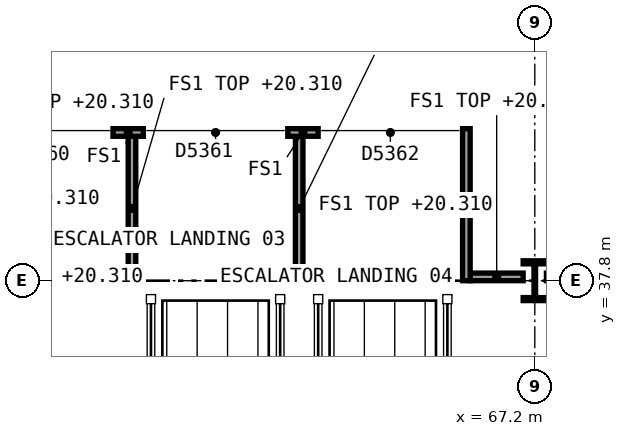
"""IFC4 building model, lengths in metres.
Left out: names, types, materials, properties, quantities, classifications, styles, units other than length and angle.
Written with IfcOpenShell. Run it as: python <this file> out.ifc"""

import sys

from ifc_helpers import new_model, si_unit, direction, frame, frame_2d, origin, origin_2d, place, context, subcontext, project, spatial, rectangle, i_section, extrude, element, fill, save


model = new_model("IFC4")
c1 = context("Model", 3, precision=1e-05, world=origin(), true_north=direction((0.0, 1.0)))
c2 = subcontext(c1, "Body", "Model", "MODEL_VIEW")
j1 = project(units=[si_unit("LENGTHUNIT", "METRE"), si_unit("PLANEANGLEUNIT", "RADIAN")], contexts=[c1])
p1 = place(None, origin())
s1 = spatial("IfcSite", under=j1, at=p1, CompositionType="ELEMENT")
p2 = place(p1, origin())
s2 = spatial("IfcBuilding", under=s1, at=p2, CompositionType="ELEMENT")
p3 = place(p2, frame((0.0, 0.0, 16.2)))
s3 = spatial("IfcBuildingStorey", under=s2, at=p3, CompositionType="ELEMENT", Elevation=16.2)
p4 = place(p3, frame((67.2, 37.8, 0.0), z_axis=(0.0, 0.0, 1.0), x_axis=(1.0, 0.0, 0.0)))
e1 = element("IfcColumn", 1, at=p4, inside=s3, PredefinedType="COLUMN", context=c2, shape_type="SweptSolid", body=[
    extrude(i_section(OverallWidth=0.306, OverallDepth=0.524, WebThickness=0.021, FlangeThickness=0.04, FilletRadius=0.027, at=origin_2d()), origin(), (0.0, 0.0, 1.0), 4.8),
])
p5 = place(p3, frame((66.35, 37.85, 0.0), z_axis=(0.0, 0.0, 1.0), x_axis=(1.0, 0.0, 0.0)))
e2 = element("IfcWall", 2, at=p5, inside=s3, PredefinedType="PARTITIONING", context=c2, shape_type="SweptSolid", body=[
    extrude(rectangle(XDim=0.697, YDim=0.1, at=frame_2d((0.349, 0.0))), origin(), (0.0, 0.0, 1.0), 4.11),
])
for number, where, z_axis, x_axis in (
    (3, (61.9, 37.8, 0.0), (0.0, 0.0, 1.0), (0.0, 1.0, 0.0)),
    (4, (64.1, 37.8, 0.0), (0.0, 0.0, 1.0), (0.0, 1.0, 0.0)),
):
    element("IfcWall", number, at=place(p3, frame(where, z_axis=z_axis, x_axis=x_axis)), inside=s3, PredefinedType="PARTITIONING", context=c2, shape_type="SweptSolid", body=[
        extrude(rectangle(XDim=1.9, YDim=0.1, at=frame_2d((0.95, 0.0))), origin(), (0.0, 0.0, 1.0), 4.11),
    ])
p6 = place(p3, frame((66.3, 37.8, 0.0), z_axis=(0.0, 0.0, 1.0), x_axis=(0.0, 1.0, 0.0)))
e5 = element("IfcWall", 5, at=p6, inside=s3, PredefinedType="PARTITIONING", context=c2, shape_type="SweptSolid", body=[
    extrude(rectangle(XDim=2.0, YDim=0.1, at=frame_2d((1.0, 0.0))), origin(), (0.0, 0.0, 1.0), 4.11),
])
p7 = place(p3, frame((59.75, 39.75, 0.0), z_axis=(0.0, 0.0, 1.0), x_axis=(1.0, 0.0, 0.0)))
e6 = element("IfcWall", 6, at=p7, inside=s3, PredefinedType="PARTITIONING", context=c2, shape_type="SweptSolid", body=[
    extrude(rectangle(XDim=6.5, YDim=0.1, at=frame_2d((3.25, 0.0))), origin(), (0.0, 0.0, 1.0), 4.65),
])
p8 = place(p7, origin())
e7 = element("IfcOpeningElement", 7, at=p8, cuts=e6, PredefinedType="OPENING", context=c2, shape_type="SweptSolid", body=[
    extrude(rectangle(XDim=1.91, YDim=2.4, at=frame_2d((0.945, 1.2))), frame((0.0, 0.06, 0.0), z_axis=(0.0, -1.0, 0.0), x_axis=(1.0, 0.0, 0.0)), (0.0, 0.0, 1.0), 0.12),
])
p9 = place(p7, frame((2.3, 0.0, 0.0)))
e8 = element("IfcOpeningElement", 8, at=p9, cuts=e6, PredefinedType="OPENING", context=c2, shape_type="SweptSolid", body=[
    extrude(rectangle(XDim=1.9, YDim=2.4, at=frame_2d((0.95, 1.2))), frame((0.0, 0.06, 0.0), z_axis=(0.0, -1.0, 0.0), x_axis=(1.0, 0.0, 0.0)), (0.0, 0.0, 1.0), 0.12),
])
p10 = place(p7, frame((4.6, 0.0, 0.0)))
e9 = element("IfcOpeningElement", 9, at=p10, cuts=e6, PredefinedType="OPENING", context=c2, shape_type="SweptSolid", body=[
    extrude(rectangle(XDim=1.91, YDim=2.4, at=frame_2d((0.955, 1.2))), frame((0.0, 0.06, 0.0), z_axis=(0.0, -1.0, 0.0), x_axis=(1.0, 0.0, 0.0)), (0.0, 0.0, 1.0), 0.12),
])
p11 = place(p8, origin())
e10 = element("IfcDoor", 10, at=p11, inside=s3, OperationType="DOUBLE_DOOR_SLIDING", PredefinedType="DOOR", context=c2, shape_type="SweptSolid", body=[
    extrude(rectangle(XDim=1.9, YDim=2.4, at=frame_2d((0.95, 1.2))), frame((0.0, 0.025, 0.0), z_axis=(0.0, -1.0, 0.0), x_axis=(1.0, 0.0, 0.0)), (0.0, 0.0, 1.0), 0.05),
])
fill(e7, e10)
p12 = place(p9, origin())
e11 = element("IfcDoor", 11, at=p12, inside=s3, OperationType="DOUBLE_DOOR_SLIDING", PredefinedType="DOOR", context=c2, shape_type="SweptSolid", body=[
    extrude(rectangle(XDim=1.9, YDim=2.4, at=frame_2d((0.95, 1.2))), frame((0.0, 0.025, 0.0), z_axis=(0.0, -1.0, 0.0), x_axis=(1.0, 0.0, 0.0)), (0.0, 0.0, 1.0), 0.05),
])
fill(e8, e11)
p13 = place(p10, origin())
e12 = element("IfcDoor", 12, at=p13, inside=s3, OperationType="DOUBLE_DOOR_SLIDING", PredefinedType="DOOR", context=c2, shape_type="SweptSolid", body=[
    extrude(rectangle(XDim=1.9, YDim=2.4, at=frame_2d((0.95, 1.2))), frame((0.0, 0.025, 0.0), z_axis=(0.0, -1.0, 0.0), x_axis=(1.0, 0.0, 0.0)), (0.0, 0.0, 1.0), 0.05),
])
fill(e9, e12)
save(model, sys.argv[1])
